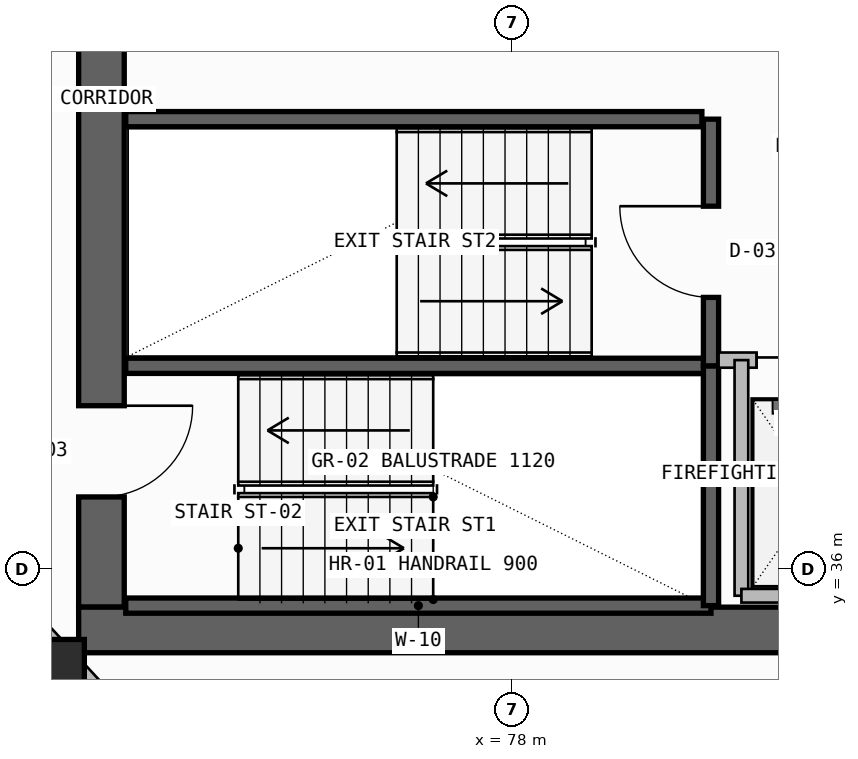
"""IFC4 building model, lengths in metres.
Left out: names, types, materials, properties, quantities, classifications, styles, units other than length and angle.
Written with IfcOpenShell. Run it as: python <this file> out.ifc"""

import sys

from ifc_helpers import new_model, si_unit, direction, frame, frame_2d, origin, origin_2d, place, context, subcontext, project, spatial, rectangle, extrude, element, fill, save


model = new_model("IFC4")
c1 = context("Model", 3, precision=1e-05, world=origin(), true_north=direction((0.0, 1.0)))
c2 = subcontext(c1, "Body", "Model", "MODEL_VIEW")
j1 = project(units=[si_unit("LENGTHUNIT", "METRE"), si_unit("PLANEANGLEUNIT", "RADIAN")], contexts=[c1])
p1 = place(None, origin())
s1 = spatial("IfcSite", under=j1, at=p1, CompositionType="ELEMENT")
p2 = place(p1, origin())
s2 = spatial("IfcBuilding", under=s1, at=p2, CompositionType="ELEMENT")
p3 = place(p2, frame((0.0, 0.0, 267.78)))
s3 = spatial("IfcBuildingStorey", under=s2, at=p3, CompositionType="ELEMENT", Elevation=267.78)
p4 = place(p3, frame((72.6, 35.5, -0.26), z_axis=(0.0, 0.0, 1.0), x_axis=(0.0, 1.0, 0.0)))
e1 = element("IfcWall", 1, at=p4, inside=s3, PredefinedType="SHEAR", context=c2, shape_type="SweptSolid", body=[
    extrude(rectangle(XDim=7.85, YDim=0.6, at=frame_2d((3.925, 0.0))), origin(), (0.0, 0.0, 1.0), 3.52),
])
p5 = place(p4, frame((1.45, 0.0, 0.26)))
e2 = element("IfcOpeningElement", 2, at=p5, cuts=e1, PredefinedType="OPENING", context=c2, shape_type="SweptSolid", body=[
    extrude(rectangle(XDim=1.2, YDim=2.2, at=frame_2d((0.6, 1.1))), frame((0.0, 0.31, 0.0), z_axis=(0.0, -1.0, 0.0), x_axis=(1.0, 0.0, 0.0)), (0.0, 0.0, 1.0), 0.62),
])
p6 = place(p3, frame((72.3, 35.2, -0.26), z_axis=(0.0, 0.0, 1.0), x_axis=(1.0, 0.0, 0.0)))
e3 = element("IfcWall", 3, at=p6, inside=s3, PredefinedType="SHEAR", context=c2, shape_type="SweptSolid", body=[
    extrude(rectangle(XDim=13.3, YDim=0.6, at=frame_2d((6.65, 0.0))), origin(), (0.0, 0.0, 1.0), 3.52),
])
p7 = place(p3, frame((72.0, 34.7, 0.0), z_axis=(0.0, 0.0, 1.0), x_axis=(1.0, 0.0, 0.0)))
e4 = element("IfcColumn", 4, at=p7, inside=s3, PredefinedType="COLUMN", context=c2, shape_type="SweptSolid", body=[
    extrude(rectangle(XDim=0.75, YDim=0.75, at=origin_2d()), origin(), (0.0, 0.0, 1.0), 3.52),
])
p8 = place(p3, frame((72.881, 34.058, 0.0), z_axis=(0.0, 0.0, 1.0), x_axis=(-0.678651758246, 0.734460203843, 0.0)))
e5 = element("IfcWall", 5, at=p8, inside=s3, PredefinedType="PARAPET", context=c2, shape_type="SweptSolid", body=[
    extrude(rectangle(XDim=0.927, YDim=0.2, at=frame_2d((0.464, 0.0))), origin(), (0.0, 0.0, 1.0), 1.15),
])
p9 = place(p3, frame((72.059, 34.948, 0.0), z_axis=(0.0, 0.0, 1.0), x_axis=(-0.678740051818, 0.734378609478, 0.0)))
e6 = element("IfcWall", 6, at=p9, inside=s3, PredefinedType="PARAPET", context=c2, shape_type="SweptSolid", body=[
    extrude(rectangle(XDim=0.97, YDim=0.2, at=frame_2d((0.485, 0.0))), origin(), (0.0, 0.0, 1.0), 1.15),
])
for number, where, z_axis, x_axis in (
    (7, (72.92, 35.52, -0.26), (0.0, 0.0, 1.0), (1.0, 0.0, 0.0)),
    (8, (72.92, 38.675, -0.26), (0.0, 0.0, 1.0), (1.0, 0.0, 0.0)),
):
    element("IfcWall", number, at=place(p3, frame(where, z_axis=z_axis, x_axis=x_axis)), inside=s3, PredefinedType="SOLIDWALL", context=c2, shape_type="SweptSolid", body=[
        extrude(rectangle(XDim=7.7, YDim=0.2, at=frame_2d((3.85, 0.0))), origin(), (0.0, 0.0, 1.0), 3.52),
    ])
p10 = place(p3, frame((80.62, 35.52, -0.26), z_axis=(0.0, 0.0, 1.0), x_axis=(0.0, 1.0, 0.0)))
e9 = element("IfcWall", 9, at=p10, inside=s3, PredefinedType="SOLIDWALL", context=c2, shape_type="SweptSolid", body=[
    extrude(rectangle(XDim=3.155, YDim=0.2, at=frame_2d((1.578, 0.0))), origin(), (0.0, 0.0, 1.0), 3.52),
])
p11 = place(p3, frame((80.62, 38.675, -0.26), z_axis=(0.0, 0.0, 1.0), x_axis=(0.0, 1.0, 0.0)))
e10 = element("IfcWall", 10, at=p11, inside=s3, PredefinedType="SOLIDWALL", context=c2, shape_type="SweptSolid", body=[
    extrude(rectangle(XDim=3.245, YDim=0.2, at=frame_2d((1.623, 0.0))), origin(), (0.0, 0.0, 1.0), 3.52),
])
p12 = place(p11, frame((0.9, 0.0, 0.26)))
e11 = element("IfcOpeningElement", 11, at=p12, cuts=e10, PredefinedType="OPENING", context=c2, shape_type="SweptSolid", body=[
    extrude(rectangle(XDim=1.2, YDim=2.2, at=frame_2d((0.6, 1.1))), frame((0.0, 0.11, 0.0), z_axis=(0.0, -1.0, 0.0), x_axis=(1.0, 0.0, 0.0)), (0.0, 0.0, 1.0), 0.22),
])
p13 = place(p3, frame((80.72, 38.75, 0.0), z_axis=(0.0, 0.0, 1.0), x_axis=(1.0, 0.0, 0.0)))
e12 = element("IfcWall", 12, at=p13, inside=s3, PredefinedType="SOLIDWALL", context=c2, shape_type="SweptSolid", body=[
    extrude(rectangle(XDim=4.26, YDim=0.2, at=frame_2d((2.13, 0.0))), origin(), (0.0, 0.0, 1.0), 3.26),
])
p14 = place(p13, frame((0.5, 0.0, 0.0)))
e13 = element("IfcOpeningElement", 13, at=p14, cuts=e12, PredefinedType="OPENING", context=c2, shape_type="SweptSolid", body=[
    extrude(rectangle(XDim=1.3, YDim=2.3, at=frame_2d((0.65, 1.15))), frame((0.0, 0.11, 0.0), z_axis=(0.0, -1.0, 0.0), x_axis=(1.0, 0.0, 0.0)), (0.0, 0.0, 1.0), 0.22),
])
p15 = place(p13, frame((2.45, 0.0, 0.0)))
e14 = element("IfcOpeningElement", 14, at=p15, cuts=e12, PredefinedType="OPENING", context=c2, shape_type="SweptSolid", body=[
    extrude(rectangle(XDim=1.3, YDim=2.3, at=frame_2d((0.65, 1.15))), frame((0.0, 0.11, 0.0), z_axis=(0.0, -1.0, 0.0), x_axis=(1.0, 0.0, 0.0)), (0.0, 0.0, 1.0), 0.22),
])
p16 = place(p3, frame((81.02, 35.65, 0.0), z_axis=(0.0, 0.0, 1.0), x_axis=(0.0, 1.0, 0.0)))
e15 = element("IfcWall", 15, at=p16, inside=s3, PredefinedType="SOLIDWALL", context=c2, shape_type="SweptSolid", body=[
    extrude(rectangle(XDim=3.1, YDim=0.18, at=frame_2d((1.55, 0.0))), origin(), (0.0, 0.0, 1.0), 3.26),
])
p17 = place(p3, frame((81.02, 35.65, 0.0), z_axis=(0.0, 0.0, 1.0), x_axis=(1.0, 0.0, 0.0)))
e16 = element("IfcWall", 16, at=p17, inside=s3, PredefinedType="SOLIDWALL", context=c2, shape_type="SweptSolid", body=[
    extrude(rectangle(XDim=3.93, YDim=0.18, at=frame_2d((1.965, 0.0))), origin(), (0.0, 0.0, 1.0), 3.26),
])
p18 = place(p3, frame((72.92, 41.92, -0.26), z_axis=(0.0, 0.0, 1.0), x_axis=(1.0, 0.0, 0.0)))
e17 = element("IfcWall", 17, at=p18, inside=s3, PredefinedType="SOLIDWALL", context=c2, shape_type="SweptSolid", body=[
    extrude(rectangle(XDim=7.58, YDim=0.2, at=frame_2d((3.79, 0.0))), origin(), (0.0, 0.0, 1.0), 3.52),
])
p19 = place(p5, frame((1.2, 0.0, 0.0), z_axis=(0.0, 0.0, 1.0), x_axis=(-1.0, 0.0, 0.0)))
e18 = element("IfcDoor", 18, at=p19, inside=s3, OperationType="SINGLE_SWING_LEFT", PredefinedType="USERDEFINED", context=c2, shape_type="SweptSolid", body=[
    extrude(rectangle(XDim=1.2, YDim=2.2, at=frame_2d((0.6, 1.1))), frame((0.0, 0.025, 0.0), z_axis=(0.0, -1.0, 0.0), x_axis=(1.0, 0.0, 0.0)), (0.0, 0.0, 1.0), 0.05),
])
fill(e2, e18)
p20 = place(p12, origin())
e19 = element("IfcDoor", 19, at=p20, inside=s3, OperationType="SINGLE_SWING_RIGHT", PredefinedType="USERDEFINED", context=c2, shape_type="SweptSolid", body=[
    extrude(rectangle(XDim=1.2, YDim=2.2, at=frame_2d((0.6, 1.1))), frame((0.0, 0.025, 0.0), z_axis=(0.0, -1.0, 0.0), x_axis=(1.0, 0.0, 0.0)), (0.0, 0.0, 1.0), 0.05),
])
fill(e11, e19)
p21 = place(p14, origin())
e20 = element("IfcDoor", 20, at=p21, inside=s3, OperationType="DOUBLE_DOOR_SLIDING", PredefinedType="DOOR", context=c2, shape_type="SweptSolid", body=[
    extrude(rectangle(XDim=1.3, YDim=2.3, at=frame_2d((0.65, 1.15))), frame((0.0, 0.025, 0.0), z_axis=(0.0, -1.0, 0.0), x_axis=(1.0, 0.0, 0.0)), (0.0, 0.0, 1.0), 0.05),
])
fill(e13, e20)
save(model, sys.argv[1])
